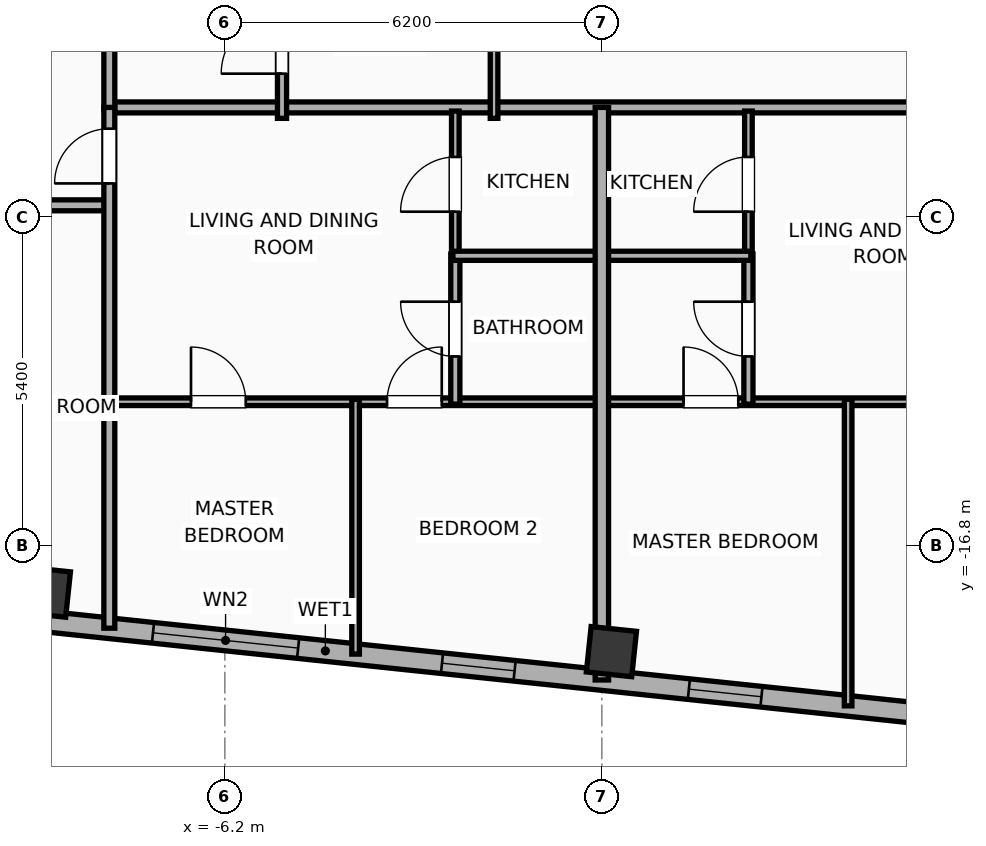
"""IFC4 building model, lengths in metres.
Left out: names, types, materials, properties, quantities, classifications, styles, units other than length and angle.
Written with IfcOpenShell. Run it as: python <this file> out.ifc"""

import sys

from ifc_helpers import new_model, si_unit, direction, frame, frame_2d, origin, origin_2d, place, context, subcontext, project, spatial, rectangle, hollow_rectangle, extrude, element, fill, save


model = new_model("IFC4")
c1 = context("Model", 3, precision=1e-05, world=origin(), true_north=direction((0.0, 1.0)))
c2 = subcontext(c1, "Body", "Model", "MODEL_VIEW")
j1 = project(units=[si_unit("LENGTHUNIT", "METRE"), si_unit("PLANEANGLEUNIT", "RADIAN")], contexts=[c1])
p1 = place(None, origin())
s1 = spatial("IfcSite", under=j1, at=p1, CompositionType="ELEMENT")
p2 = place(p1, origin())
s2 = spatial("IfcBuilding", under=s1, at=p2, CompositionType="ELEMENT")
p3 = place(p2, frame((0.0, 0.0, 287.3)))
s3 = spatial("IfcBuildingStorey", under=s2, at=p3, CompositionType="ELEMENT", Elevation=287.3)
for number, where, z_axis, x_axis in (
    (1, (-9.152, -17.561, 0.0), (0.0, 0.0, 1.0), (0.995, -0.105, 0.0)),
    (2, (0.157, -18.54, 0.0), (0.0, 0.0, 1.0), (0.995, -0.105, 0.0)),
):
    element("IfcColumn", number, at=place(p3, frame(where, z_axis=z_axis, x_axis=x_axis)), inside=s3, PredefinedType="COLUMN", context=c2, shape_type="SweptSolid", body=[
        extrude(hollow_rectangle(XDim=0.75, YDim=0.75, WallThickness=0.025, at=origin_2d()), origin(), (0.0, 0.0, 1.0), 3.9),
    ])
p4 = place(p3, frame((18.708, -20.972, 0.0), z_axis=(0.0, 0.0, 1.0), x_axis=(-0.994521888554, 0.104528528102, 0.0)))
e3 = element("IfcWall", 3, at=p4, inside=s3, PredefinedType="ELEMENTEDWALL", context=c2, shape_type="SweptSolid", body=[
    extrude(rectangle(XDim=46.766, YDim=0.34, at=frame_2d((23.383, 0.0))), origin(), (0.0, 0.0, 1.0), 3.635),
])
p5 = place(p4, frame((23.833, 0.0, 0.75)))
e4 = element("IfcOpeningElement", 4, at=p5, cuts=e3, PredefinedType="OPENING", context=c2, shape_type="SweptSolid", body=[
    extrude(rectangle(XDim=2.4, YDim=2.1, at=frame_2d((1.2, 1.05))), frame((0.0, 0.18, 0.0), z_axis=(0.0, -1.0, 0.0), x_axis=(1.0, 0.0, 0.0)), (0.0, 0.0, 1.0), 0.36),
])
p6 = place(p4, frame((38.622, 0.0, 0.75)))
e5 = element("IfcOpeningElement", 5, at=p6, cuts=e3, PredefinedType="OPENING", context=c2, shape_type="SweptSolid", body=[
    extrude(rectangle(XDim=2.4, YDim=2.1, at=frame_2d((1.2, 1.05))), frame((0.0, 0.18, 0.0), z_axis=(0.0, -1.0, 0.0), x_axis=(1.0, 0.0, 0.0)), (0.0, 0.0, 1.0), 0.36),
])
p7 = place(p4, frame((44.402, 0.0, 0.75)))
e6 = element("IfcOpeningElement", 6, at=p7, cuts=e3, PredefinedType="OPENING", context=c2, shape_type="SweptSolid", body=[
    extrude(rectangle(XDim=1.2, YDim=2.05, at=frame_2d((0.6, 1.025))), frame((0.0, 0.18, 0.0), z_axis=(0.0, -1.0, 0.0), x_axis=(1.0, 0.0, 0.0)), (0.0, 0.0, 1.0), 0.36),
])
p8 = place(p4, frame((42.358, 0.0, 0.75)))
e7 = element("IfcOpeningElement", 7, at=p8, cuts=e3, PredefinedType="OPENING", context=c2, shape_type="SweptSolid", body=[
    extrude(rectangle(XDim=1.2, YDim=2.05, at=frame_2d((0.6, 1.025))), frame((0.0, 0.18, 0.0), z_axis=(0.0, -1.0, 0.0), x_axis=(1.0, 0.0, 0.0)), (0.0, 0.0, 1.0), 0.36),
])
p9 = place(p4, frame((34.933, 0.0, 0.75)))
e8 = element("IfcOpeningElement", 8, at=p9, cuts=e3, PredefinedType="OPENING", context=c2, shape_type="SweptSolid", body=[
    extrude(rectangle(XDim=1.2, YDim=2.05, at=frame_2d((0.6, 1.025))), frame((0.0, 0.18, 0.0), z_axis=(0.0, -1.0, 0.0), x_axis=(1.0, 0.0, 0.0)), (0.0, 0.0, 1.0), 0.36),
])
p10 = place(p4, frame((28.704, 0.0, 0.75)))
e9 = element("IfcOpeningElement", 9, at=p10, cuts=e3, PredefinedType="OPENING", context=c2, shape_type="SweptSolid", body=[
    extrude(rectangle(XDim=1.2, YDim=2.05, at=frame_2d((0.6, 1.025))), frame((0.0, 0.18, 0.0), z_axis=(0.0, -1.0, 0.0), x_axis=(1.0, 0.0, 0.0)), (0.0, 0.0, 1.0), 0.36),
])
p11 = place(p4, frame((30.849, 0.0, 0.75)))
e10 = element("IfcOpeningElement", 10, at=p11, cuts=e3, PredefinedType="OPENING", context=c2, shape_type="SweptSolid", body=[
    extrude(rectangle(XDim=1.2, YDim=2.05, at=frame_2d((0.6, 1.025))), frame((0.0, 0.18, 0.0), z_axis=(0.0, -1.0, 0.0), x_axis=(1.0, 0.0, 0.0)), (0.0, 0.0, 1.0), 0.36),
])
p12 = place(p4, frame((7.479, 0.0, 0.75)))
e11 = element("IfcOpeningElement", 11, at=p12, cuts=e3, PredefinedType="OPENING", context=c2, shape_type="SweptSolid", body=[
    extrude(rectangle(XDim=1.2, YDim=2.05, at=frame_2d((0.6, 1.025))), frame((0.0, 0.18, 0.0), z_axis=(0.0, -1.0, 0.0), x_axis=(1.0, 0.0, 0.0)), (0.0, 0.0, 1.0), 0.36),
])
p13 = place(p4, frame((3.796, 0.0, 0.75)))
e12 = element("IfcOpeningElement", 12, at=p13, cuts=e3, PredefinedType="OPENING", context=c2, shape_type="SweptSolid", body=[
    extrude(rectangle(XDim=1.2, YDim=2.05, at=frame_2d((0.6, 1.025))), frame((0.0, 0.18, 0.0), z_axis=(0.0, -1.0, 0.0), x_axis=(1.0, 0.0, 0.0)), (0.0, 0.0, 1.0), 0.36),
])
p14 = place(p4, frame((1.388, 0.0, 0.75)))
e13 = element("IfcOpeningElement", 13, at=p14, cuts=e3, PredefinedType="OPENING", context=c2, shape_type="SweptSolid", body=[
    extrude(rectangle(XDim=1.2, YDim=2.05, at=frame_2d((0.6, 1.025))), frame((0.0, 0.18, 0.0), z_axis=(0.0, -1.0, 0.0), x_axis=(1.0, 0.0, 0.0)), (0.0, 0.0, 1.0), 0.36),
])
p15 = place(p4, frame((20.254, 0.0, 0.75)))
e14 = element("IfcOpeningElement", 14, at=p15, cuts=e3, PredefinedType="OPENING", context=c2, shape_type="SweptSolid", body=[
    extrude(rectangle(XDim=1.2, YDim=2.05, at=frame_2d((0.6, 1.025))), frame((0.0, 0.18, 0.0), z_axis=(0.0, -1.0, 0.0), x_axis=(1.0, 0.0, 0.0)), (0.0, 0.0, 1.0), 0.36),
])
p16 = place(p4, frame((16.172, 0.0, 0.75)))
e15 = element("IfcOpeningElement", 15, at=p16, cuts=e3, PredefinedType="OPENING", context=c2, shape_type="SweptSolid", body=[
    extrude(rectangle(XDim=1.2, YDim=2.05, at=frame_2d((0.6, 1.025))), frame((0.0, 0.18, 0.0), z_axis=(0.0, -1.0, 0.0), x_axis=(1.0, 0.0, 0.0)), (0.0, 0.0, 1.0), 0.36),
])
p17 = place(p4, frame((12.11, 0.0, 0.75)))
e16 = element("IfcOpeningElement", 16, at=p17, cuts=e3, PredefinedType="OPENING", context=c2, shape_type="SweptSolid", body=[
    extrude(rectangle(XDim=1.2, YDim=2.05, at=frame_2d((0.6, 1.025))), frame((0.0, 0.18, 0.0), z_axis=(0.0, -1.0, 0.0), x_axis=(1.0, 0.0, 0.0)), (0.0, 0.0, 1.0), 0.36),
])
p18 = place(p3, frame((-8.15, -9.59, 0.0), z_axis=(0.0, 0.0, 1.0), x_axis=(1.0, 0.0, 0.0)))
e17 = element("IfcWall", 17, at=p18, inside=s3, PredefinedType="PARTITIONING", context=c2, shape_type="SweptSolid", body=[
    extrude(rectangle(XDim=16.3, YDim=0.18, at=frame_2d((8.15, 0.0))), origin(), (0.0, 0.0, 1.0), 3.635),
])
p19 = place(p3, frame((-8.1, -9.63, 0.0), z_axis=(0.0, 0.0, 1.0), x_axis=(0.0, 1.0, 0.0)))
e18 = element("IfcWall", 18, at=p19, inside=s3, PredefinedType="PARTITIONING", context=c2, shape_type="SweptSolid", body=[
    extrude(rectangle(XDim=19.26, YDim=0.18, at=frame_2d((9.63, 0.0))), origin(), (0.0, 0.0, 1.0), 3.635),
])
p20 = place(p19, frame((1.426, 0.0, 0.0)))
e19 = element("IfcOpeningElement", 19, at=p20, cuts=e18, PredefinedType="OPENING", context=c2, shape_type="SweptSolid", body=[
    extrude(rectangle(XDim=1.0, YDim=2.05, at=frame_2d((0.5, 1.025))), frame((0.0, 0.1, 0.0), z_axis=(0.0, -1.0, 0.0), x_axis=(1.0, 0.0, 0.0)), (0.0, 0.0, 1.0), 0.2),
])
p21 = place(p19, frame((11.081, 0.0, 0.0)))
e20 = element("IfcOpeningElement", 20, at=p21, cuts=e18, PredefinedType="OPENING", context=c2, shape_type="SweptSolid", body=[
    extrude(rectangle(XDim=0.95, YDim=2.05, at=frame_2d((0.475, 1.025))), frame((0.0, 0.1, 0.0), z_axis=(0.0, -1.0, 0.0), x_axis=(1.0, 0.0, 0.0)), (0.0, 0.0, 1.0), 0.2),
])
p22 = place(p3, frame((-5.26, -9.77, 0.0), z_axis=(0.0, 0.0, 1.0), x_axis=(0.0, 1.0, 0.0)))
e21 = element("IfcWall", 21, at=p22, inside=s3, PredefinedType="PLUMBINGWALL", context=c2, shape_type="SweptSolid", body=[
    extrude(rectangle(XDim=3.35, YDim=0.15, at=frame_2d((1.675, 0.0))), origin(), (0.0, 0.0, 1.0), 3.635),
])
p23 = place(p22, frame((0.735, 0.0, 0.0)))
e22 = element("IfcOpeningElement", 22, at=p23, cuts=e21, PredefinedType="OPENING", context=c2, shape_type="SweptSolid", body=[
    extrude(rectangle(XDim=1.0, YDim=2.05, at=frame_2d((0.5, 1.025))), frame((0.0, 0.085, 0.0), z_axis=(0.0, -1.0, 0.0), x_axis=(1.0, 0.0, 0.0)), (0.0, 0.0, 1.0), 0.17),
])
p24 = place(p3, frame((-1.773, -9.77, 0.0), z_axis=(0.0, 0.0, 1.0), x_axis=(0.0, 1.0, 0.0)))
e23 = element("IfcWall", 23, at=p24, inside=s3, PredefinedType="PARTITIONING", context=c2, shape_type="SweptSolid", body=[
    extrude(rectangle(XDim=19.49, YDim=0.125, at=frame_2d((9.745, 0.0))), origin(), (0.0, 0.0, 1.0), 3.635),
])
p25 = place(p24, frame((9.27, 0.0, 0.0)))
e24 = element("IfcOpeningElement", 24, at=p25, cuts=e23, PredefinedType="OPENING", context=c2, shape_type="SweptSolid", body=[
    extrude(rectangle(XDim=0.95, YDim=2.05, at=frame_2d((0.475, 1.025))), frame((0.0, 0.073, 0.0), z_axis=(0.0, -1.0, 0.0), x_axis=(1.0, 0.0, 0.0)), (0.0, 0.0, 1.0), 0.145),
])
p26 = place(p3, frame((-30.755, -11.2, 0.0), z_axis=(0.0, 0.0, 1.0), x_axis=(1.0, 0.0, 0.0)))
e25 = element("IfcWall", 25, at=p26, inside=s3, PredefinedType="PARTITIONING", context=c2, shape_type="SweptSolid", body=[
    extrude(rectangle(XDim=22.675, YDim=0.18, at=frame_2d((11.337, 0.0))), origin(), (0.0, 0.0, 1.0), 3.635),
])
p27 = place(p26, frame((2.414, 0.0, 0.0)))
e26 = element("IfcOpeningElement", 26, at=p27, cuts=e25, PredefinedType="OPENING", context=c2, shape_type="SweptSolid", body=[
    extrude(rectangle(XDim=0.9, YDim=2.05, at=frame_2d((0.45, 1.025))), frame((0.0, 0.1, 0.0), z_axis=(0.0, -1.0, 0.0), x_axis=(1.0, 0.0, 0.0)), (0.0, 0.0, 1.0), 0.2),
])
p28 = place(p26, frame((8.987, 0.0, 0.0)))
e27 = element("IfcOpeningElement", 27, at=p28, cuts=e25, PredefinedType="OPENING", context=c2, shape_type="SweptSolid", body=[
    extrude(rectangle(XDim=1.15, YDim=2.05, at=frame_2d((0.575, 1.025))), frame((0.0, 0.1, 0.0), z_axis=(0.0, -1.0, 0.0), x_axis=(1.0, 0.0, 0.0)), (0.0, 0.0, 1.0), 0.2),
])
p29 = place(p26, frame((13.854, 0.0, 0.0)))
e28 = element("IfcOpeningElement", 28, at=p29, cuts=e25, PredefinedType="OPENING", context=c2, shape_type="SweptSolid", body=[
    extrude(rectangle(XDim=0.9, YDim=2.05, at=frame_2d((0.45, 1.025))), frame((0.0, 0.1, 0.0), z_axis=(0.0, -1.0, 0.0), x_axis=(1.0, 0.0, 0.0)), (0.0, 0.0, 1.0), 0.2),
])
p30 = place(p26, frame((20.433, 0.0, 0.0)))
e29 = element("IfcOpeningElement", 29, at=p30, cuts=e25, PredefinedType="OPENING", context=c2, shape_type="SweptSolid", body=[
    extrude(rectangle(XDim=1.15, YDim=2.05, at=frame_2d((0.575, 1.025))), frame((0.0, 0.1, 0.0), z_axis=(0.0, -1.0, 0.0), x_axis=(1.0, 0.0, 0.0)), (0.0, 0.0, 1.0), 0.2),
])
p31 = place(p3, frame((-8.08, -14.43, 0.0), z_axis=(0.0, 0.0, 1.0), x_axis=(1.0, 0.0, 0.0)))
e30 = element("IfcWall", 30, at=p31, inside=s3, PredefinedType="PARTITIONING", context=c2, shape_type="SweptSolid", body=[
    extrude(rectangle(XDim=8.06, YDim=0.125, at=frame_2d((4.03, 0.0))), origin(), (0.0, 0.0, 1.0), 3.635),
])
p32 = place(p31, frame((1.323, 0.0, 0.0)))
e31 = element("IfcOpeningElement", 31, at=p32, cuts=e30, PredefinedType="OPENING", context=c2, shape_type="SweptSolid", body=[
    extrude(rectangle(XDim=0.9, YDim=2.05, at=frame_2d((0.45, 1.025))), frame((0.0, 0.073, 0.0), z_axis=(0.0, -1.0, 0.0), x_axis=(1.0, 0.0, 0.0)), (0.0, 0.0, 1.0), 0.145),
])
p33 = place(p31, frame((4.547, 0.0, 0.0)))
e32 = element("IfcOpeningElement", 32, at=p33, cuts=e30, PredefinedType="OPENING", context=c2, shape_type="SweptSolid", body=[
    extrude(rectangle(XDim=0.9, YDim=2.05, at=frame_2d((0.45, 1.025))), frame((0.0, 0.073, 0.0), z_axis=(0.0, -1.0, 0.0), x_axis=(1.0, 0.0, 0.0)), (0.0, 0.0, 1.0), 0.145),
])
p34 = place(p3, frame((-2.41, -12.06, 0.0), z_axis=(0.0, 0.0, 1.0), x_axis=(0.0, 1.0, 0.0)))
e33 = element("IfcWall", 33, at=p34, inside=s3, PredefinedType="PARTITIONING", context=c2, shape_type="SweptSolid", body=[
    extrude(rectangle(XDim=2.41, YDim=0.125, at=frame_2d((1.205, 0.0))), origin(), (0.0, 0.0, 1.0), 3.635),
])
p35 = place(p34, frame((0.755, 0.0, 0.0)))
e34 = element("IfcOpeningElement", 34, at=p35, cuts=e33, PredefinedType="OPENING", context=c2, shape_type="SweptSolid", body=[
    extrude(rectangle(XDim=0.9, YDim=2.05, at=frame_2d((0.45, 1.025))), frame((0.0, 0.073, 0.0), z_axis=(0.0, -1.0, 0.0), x_axis=(1.0, 0.0, 0.0)), (0.0, 0.0, 1.0), 0.145),
])
p36 = place(p3, frame((-2.41, -14.47, 0.0), z_axis=(0.0, 0.0, 1.0), x_axis=(0.0, 1.0, 0.0)))
e35 = element("IfcWall", 35, at=p36, inside=s3, PredefinedType="PLUMBINGWALL", context=c2, shape_type="SweptSolid", body=[
    extrude(rectangle(XDim=2.47, YDim=0.15, at=frame_2d((1.235, 0.0))), origin(), (0.0, 0.0, 1.0), 3.635),
])
p37 = place(p36, frame((0.785, 0.0, 0.0)))
e36 = element("IfcOpeningElement", 36, at=p37, cuts=e35, PredefinedType="OPENING", context=c2, shape_type="SweptSolid", body=[
    extrude(rectangle(XDim=0.9, YDim=2.05, at=frame_2d((0.45, 1.025))), frame((0.0, 0.085, 0.0), z_axis=(0.0, -1.0, 0.0), x_axis=(1.0, 0.0, 0.0)), (0.0, 0.0, 1.0), 0.17),
])
p38 = place(p3, frame((-2.45, -12.03, 0.0), z_axis=(0.0, 0.0, 1.0), x_axis=(1.0, 0.0, 0.0)))
e37 = element("IfcWall", 37, at=p38, inside=s3, PredefinedType="PLUMBINGWALL", context=c2, shape_type="SweptSolid", body=[
    extrude(rectangle(XDim=2.43, YDim=0.15, at=frame_2d((1.215, 0.0))), origin(), (0.0, 0.0, 1.0), 3.635),
])
p39 = place(p3, frame((-4.05, -18.58, 0.0), z_axis=(0.0, 0.0, 1.0), x_axis=(0.0, 1.0, 0.0)))
e38 = element("IfcWall", 38, at=p39, inside=s3, PredefinedType="PARTITIONING", context=c2, shape_type="SweptSolid", body=[
    extrude(rectangle(XDim=4.19, YDim=0.125, at=frame_2d((2.095, 0.0))), origin(), (0.0, 0.0, 1.0), 3.635),
])
p40 = place(p3, frame((-8.1, -18.155, 0.0), z_axis=(0.0, 0.0, 1.0), x_axis=(0.0, 1.0, 0.0)))
e39 = element("IfcWall", 39, at=p40, inside=s3, PredefinedType="PARTITIONING", context=c2, shape_type="SweptSolid", body=[
    extrude(rectangle(XDim=8.564, YDim=0.18, at=frame_2d((4.282, 0.0))), origin(), (0.0, 0.0, 1.0), 3.635),
])
p41 = place(p40, frame((7.315, 0.0, 0.0)))
e40 = element("IfcOpeningElement", 40, at=p41, cuts=e39, PredefinedType="OPENING", context=c2, shape_type="SweptSolid", body=[
    extrude(rectangle(XDim=0.9, YDim=2.05, at=frame_2d((0.45, 1.025))), frame((0.0, 0.1, 0.0), z_axis=(0.0, -1.0, 0.0), x_axis=(1.0, 0.0, 0.0)), (0.0, 0.0, 1.0), 0.2),
])
p42 = place(p3, frame((0.02, -14.43, 0.0), z_axis=(0.0, 0.0, 1.0), x_axis=(1.0, 0.0, 0.0)))
e41 = element("IfcWall", 41, at=p42, inside=s3, PredefinedType="PARTITIONING", context=c2, shape_type="SweptSolid", body=[
    extrude(rectangle(XDim=8.06, YDim=0.125, at=frame_2d((4.03, 0.0))), origin(), (0.0, 0.0, 1.0), 3.635),
])
p43 = place(p42, frame((1.323, 0.0, 0.0)))
e42 = element("IfcOpeningElement", 42, at=p43, cuts=e41, PredefinedType="OPENING", context=c2, shape_type="SweptSolid", body=[
    extrude(rectangle(XDim=0.9, YDim=2.05, at=frame_2d((0.45, 1.025))), frame((0.0, 0.073, 0.0), z_axis=(0.0, -1.0, 0.0), x_axis=(1.0, 0.0, 0.0)), (0.0, 0.0, 1.0), 0.145),
])
p44 = place(p42, frame((5.837, 0.0, 0.0)))
e43 = element("IfcOpeningElement", 43, at=p44, cuts=e41, PredefinedType="OPENING", context=c2, shape_type="SweptSolid", body=[
    extrude(rectangle(XDim=0.9, YDim=2.05, at=frame_2d((0.45, 1.025))), frame((0.0, 0.073, 0.0), z_axis=(0.0, -1.0, 0.0), x_axis=(1.0, 0.0, 0.0)), (0.0, 0.0, 1.0), 0.145),
])
p45 = place(p3, frame((2.41, -12.06, 0.0), z_axis=(0.0, 0.0, 1.0), x_axis=(0.0, 1.0, 0.0)))
e44 = element("IfcWall", 44, at=p45, inside=s3, PredefinedType="PARTITIONING", context=c2, shape_type="SweptSolid", body=[
    extrude(rectangle(XDim=2.41, YDim=0.125, at=frame_2d((1.205, 0.0))), origin(), (0.0, 0.0, 1.0), 3.075),
])
p46 = place(p45, frame((0.755, 0.0, 0.0)))
e45 = element("IfcOpeningElement", 45, at=p46, cuts=e44, PredefinedType="OPENING", context=c2, shape_type="SweptSolid", body=[
    extrude(rectangle(XDim=0.9, YDim=2.05, at=frame_2d((0.45, 1.025))), frame((0.0, 0.073, 0.0), z_axis=(0.0, -1.0, 0.0), x_axis=(1.0, 0.0, 0.0)), (0.0, 0.0, 1.0), 0.145),
])
p47 = place(p3, frame((2.41, -14.47, 0.0), z_axis=(0.0, 0.0, 1.0), x_axis=(0.0, 1.0, 0.0)))
e46 = element("IfcWall", 46, at=p47, inside=s3, PredefinedType="PLUMBINGWALL", context=c2, shape_type="SweptSolid", body=[
    extrude(rectangle(XDim=2.47, YDim=0.15, at=frame_2d((1.235, 0.0))), origin(), (0.0, 0.0, 1.0), 3.075),
])
p48 = place(p47, frame((0.785, 0.0, 0.0)))
e47 = element("IfcOpeningElement", 47, at=p48, cuts=e46, PredefinedType="OPENING", context=c2, shape_type="SweptSolid", body=[
    extrude(rectangle(XDim=0.9, YDim=2.05, at=frame_2d((0.45, 1.025))), frame((0.0, 0.085, 0.0), z_axis=(0.0, -1.0, 0.0), x_axis=(1.0, 0.0, 0.0)), (0.0, 0.0, 1.0), 0.17),
])
p49 = place(p3, frame((0.02, -12.03, 0.0), z_axis=(0.0, 0.0, 1.0), x_axis=(1.0, 0.0, 0.0)))
e48 = element("IfcWall", 48, at=p49, inside=s3, PredefinedType="PLUMBINGWALL", context=c2, shape_type="SweptSolid", body=[
    extrude(rectangle(XDim=2.43, YDim=0.15, at=frame_2d((1.215, 0.0))), origin(), (0.0, 0.0, 1.0), 3.635),
])
p50 = place(p3, frame((4.05, -19.432, 0.0), z_axis=(0.0, 0.0, 1.0), x_axis=(0.0, 1.0, 0.0)))
e49 = element("IfcWall", 49, at=p50, inside=s3, PredefinedType="PARTITIONING", context=c2, shape_type="SweptSolid", body=[
    extrude(rectangle(XDim=5.042, YDim=0.125, at=frame_2d((2.521, 0.0))), origin(), (0.0, 0.0, 1.0), 3.635),
])
p51 = place(p3, frame((0.0, -19.006, 0.0), z_axis=(0.0, 0.0, 1.0), x_axis=(0.0, 1.0, 0.0)))
e50 = element("IfcWall", 50, at=p51, inside=s3, PredefinedType="PARTITIONING", context=c2, shape_type="SweptSolid", body=[
    extrude(rectangle(XDim=9.416, YDim=0.22, at=frame_2d((4.708, 0.0))), origin(), (0.0, 0.0, 1.0), 3.635),
])
p52 = place(p5, origin())
e51 = element("IfcWindow", 51, at=p52, inside=s3, PartitioningType="SINGLE_PANEL", PredefinedType="WINDOW", context=c2, shape_type="SweptSolid", body=[
    extrude(rectangle(XDim=2.4, YDim=2.1, at=frame_2d((1.2, 1.05))), frame((0.0, 0.03, 0.0), z_axis=(0.0, -1.0, 0.0), x_axis=(1.0, 0.0, 0.0)), (0.0, 0.0, 1.0), 0.06),
])
fill(e4, e51)
p53 = place(p15, origin())
e52 = element("IfcWindow", 52, at=p53, inside=s3, PartitioningType="SINGLE_PANEL", PredefinedType="WINDOW", context=c2, shape_type="SweptSolid", body=[
    extrude(rectangle(XDim=1.2, YDim=2.05, at=frame_2d((0.6, 1.025))), frame((0.0, 0.03, 0.0), z_axis=(0.0, -1.0, 0.0), x_axis=(1.0, 0.0, 0.0)), (0.0, 0.0, 1.0), 0.06),
])
fill(e14, e52)
p54 = place(p16, origin())
e53 = element("IfcWindow", 53, at=p54, inside=s3, PartitioningType="SINGLE_PANEL", PredefinedType="WINDOW", context=c2, shape_type="SweptSolid", body=[
    extrude(rectangle(XDim=1.2, YDim=2.05, at=frame_2d((0.6, 1.025))), frame((0.0, 0.03, 0.0), z_axis=(0.0, -1.0, 0.0), x_axis=(1.0, 0.0, 0.0)), (0.0, 0.0, 1.0), 0.06),
])
fill(e15, e53)
p55 = place(p23, origin())
e54 = element("IfcDoor", 54, at=p55, inside=s3, OperationType="SINGLE_SWING_LEFT", PredefinedType="DOOR", context=c2, shape_type="SweptSolid", body=[
    extrude(rectangle(XDim=1.0, YDim=2.05, at=frame_2d((0.5, 1.025))), frame((0.0, 0.025, 0.0), z_axis=(0.0, -1.0, 0.0), x_axis=(1.0, 0.0, 0.0)), (0.0, 0.0, 1.0), 0.05),
])
fill(e22, e54)
p56 = place(p32, origin())
e55 = element("IfcDoor", 55, at=p56, inside=s3, OperationType="SINGLE_SWING_LEFT", PredefinedType="DOOR", context=c2, shape_type="SweptSolid", body=[
    extrude(rectangle(XDim=0.9, YDim=2.05, at=frame_2d((0.45, 1.025))), frame((0.0, 0.025, 0.0), z_axis=(0.0, -1.0, 0.0), x_axis=(1.0, 0.0, 0.0)), (0.0, 0.0, 1.0), 0.05),
])
fill(e31, e55)
p57 = place(p33, origin())
e56 = element("IfcDoor", 56, at=p57, inside=s3, OperationType="SINGLE_SWING_RIGHT", PredefinedType="DOOR", context=c2, shape_type="SweptSolid", body=[
    extrude(rectangle(XDim=0.9, YDim=2.05, at=frame_2d((0.45, 1.025))), frame((0.0, 0.025, 0.0), z_axis=(0.0, -1.0, 0.0), x_axis=(1.0, 0.0, 0.0)), (0.0, 0.0, 1.0), 0.05),
])
fill(e32, e56)
p58 = place(p35, origin())
e57 = element("IfcDoor", 57, at=p58, inside=s3, OperationType="SINGLE_SWING_LEFT", PredefinedType="DOOR", context=c2, shape_type="SweptSolid", body=[
    extrude(rectangle(XDim=0.9, YDim=2.05, at=frame_2d((0.45, 1.025))), frame((0.0, 0.025, 0.0), z_axis=(0.0, -1.0, 0.0), x_axis=(1.0, 0.0, 0.0)), (0.0, 0.0, 1.0), 0.05),
])
fill(e34, e57)
p59 = place(p37, origin())
e58 = element("IfcDoor", 58, at=p59, inside=s3, OperationType="SINGLE_SWING_RIGHT", PredefinedType="DOOR", context=c2, shape_type="SweptSolid", body=[
    extrude(rectangle(XDim=0.9, YDim=2.05, at=frame_2d((0.45, 1.025))), frame((0.0, 0.025, 0.0), z_axis=(0.0, -1.0, 0.0), x_axis=(1.0, 0.0, 0.0)), (0.0, 0.0, 1.0), 0.05),
])
fill(e36, e58)
p60 = place(p41, origin())
e59 = element("IfcDoor", 59, at=p60, inside=s3, OperationType="SINGLE_SWING_LEFT", PredefinedType="DOOR", context=c2, shape_type="SweptSolid", body=[
    extrude(rectangle(XDim=0.9, YDim=2.05, at=frame_2d((0.45, 1.025))), frame((0.0, 0.025, 0.0), z_axis=(0.0, -1.0, 0.0), x_axis=(1.0, 0.0, 0.0)), (0.0, 0.0, 1.0), 0.05),
])
fill(e40, e59)
p61 = place(p43, origin())
e60 = element("IfcDoor", 60, at=p61, inside=s3, OperationType="SINGLE_SWING_LEFT", PredefinedType="DOOR", context=c2, shape_type="SweptSolid", body=[
    extrude(rectangle(XDim=0.9, YDim=2.05, at=frame_2d((0.45, 1.025))), frame((0.0, 0.025, 0.0), z_axis=(0.0, -1.0, 0.0), x_axis=(1.0, 0.0, 0.0)), (0.0, 0.0, 1.0), 0.05),
])
fill(e42, e60)
p62 = place(p46, origin())
e61 = element("IfcDoor", 61, at=p62, inside=s3, OperationType="SINGLE_SWING_LEFT", PredefinedType="DOOR", context=c2, shape_type="SweptSolid", body=[
    extrude(rectangle(XDim=0.9, YDim=2.05, at=frame_2d((0.45, 1.025))), frame((0.0, 0.025, 0.0), z_axis=(0.0, -1.0, 0.0), x_axis=(1.0, 0.0, 0.0)), (0.0, 0.0, 1.0), 0.05),
])
fill(e45, e61)
p63 = place(p48, origin())
e62 = element("IfcDoor", 62, at=p63, inside=s3, OperationType="SINGLE_SWING_RIGHT", PredefinedType="DOOR", context=c2, shape_type="SweptSolid", body=[
    extrude(rectangle(XDim=0.9, YDim=2.05, at=frame_2d((0.45, 1.025))), frame((0.0, 0.025, 0.0), z_axis=(0.0, -1.0, 0.0), x_axis=(1.0, 0.0, 0.0)), (0.0, 0.0, 1.0), 0.05),
])
fill(e47, e62)
save(model, sys.argv[1])
